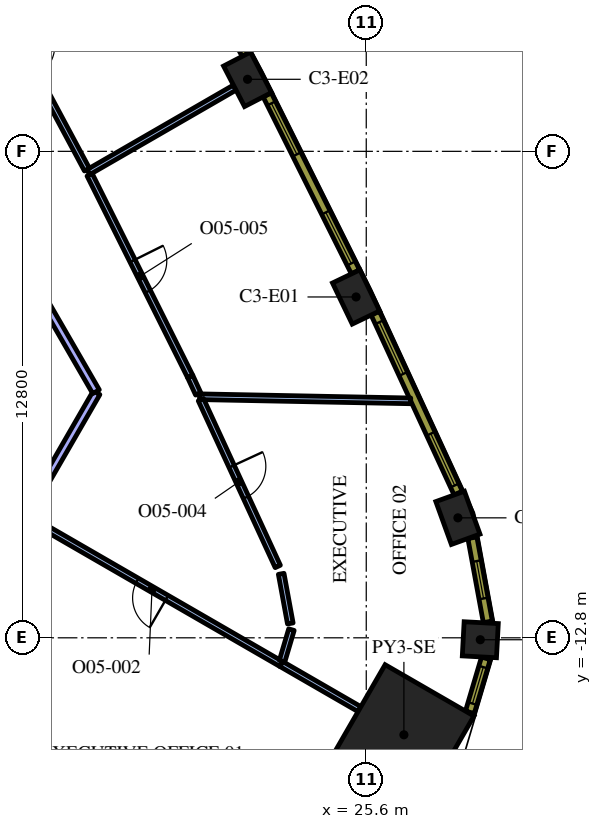
"""IFC4 building model, lengths in metres.
Left out: names, types, materials, properties, quantities, classifications, styles, units other than length and angle.
Written with IfcOpenShell. Run it as: python <this file> out.ifc"""

import sys

from ifc_helpers import new_model, si_unit, direction, frame, frame_2d, origin, origin_2d, place, context, subcontext, project, spatial, rectangle, extrude, element, fill, save


model = new_model("IFC4")
c1 = context("Model", 3, precision=1e-05, world=origin(), true_north=direction((0.0, 1.0)))
c2 = subcontext(c1, "Body", "Model", "MODEL_VIEW")
j1 = project(units=[si_unit("LENGTHUNIT", "METRE"), si_unit("PLANEANGLEUNIT", "RADIAN")], contexts=[c1])
p1 = place(None, origin())
s1 = spatial("IfcSite", under=j1, at=p1, CompositionType="ELEMENT")
p2 = place(p1, origin())
s2 = spatial("IfcBuilding", under=s1, at=p2, CompositionType="ELEMENT")
p3 = place(p2, frame((0.0, 0.0, 192.0)))
s3 = spatial("IfcBuildingStorey", under=s2, at=p3, CompositionType="ELEMENT", Elevation=192.0)
p4 = place(p3, frame((26.591, -15.352, 0.0), z_axis=(0.0, 0.0, 1.0), x_axis=(0.866025403784, -0.5, 0.0)))
e1 = element("IfcColumn", 1, at=p4, inside=s3, PredefinedType="COLUMN", context=c2, shape_type="SweptSolid", body=[
    extrude(rectangle(XDim=2.7, YDim=2.7, at=origin_2d()), origin(), (0.0, 0.0, 1.0), 4.2),
])
p5 = place(p3, frame((28.601, -12.851, 0.0), z_axis=(0.0, 0.0, 1.0), x_axis=(0.0533921468, 0.998573622053, 0.0)))
e2 = element("IfcColumn", 2, at=p5, inside=s3, PredefinedType="COLUMN", context=c2, shape_type="SweptSolid", body=[
    extrude(rectangle(XDim=0.9, YDim=0.9, at=origin_2d()), origin(), (0.0, 0.0, 1.0), 4.2),
])
for number, where, z_axis, x_axis in (
    (3, (28.012, -9.644, 0.0), (0.0, 0.0, 1.0), (-0.341, 0.94, 0.0)),
    (4, (25.332, -3.832, 0.0), (0.0, 0.0, 1.0), (-0.433, 0.902, 0.0)),
    (5, (22.476, 1.896, 0.0), (0.0, 0.0, 1.0), (-0.46, 0.888, 0.0)),
):
    element("IfcColumn", number, at=place(p3, frame(where, z_axis=z_axis, x_axis=x_axis)), inside=s3, PredefinedType="COLUMN", context=c2, shape_type="SweptSolid", body=[
        extrude(rectangle(XDim=1.2, YDim=0.8, at=origin_2d()), origin(), (0.0, 0.0, 1.0), 4.2),
    ])
p6 = place(p3, frame((23.36, -13.487, 0.0), z_axis=(0.0, 0.0, 1.0), x_axis=(0.866013104554, -0.500021302286, 0.0)))
e6 = element("IfcWall", 6, at=p6, inside=s3, PredefinedType="PARTITIONING", context=c2, shape_type="SweptSolid", body=[
    extrude(rectangle(XDim=2.381, YDim=0.15, at=frame_2d((1.19, 0.0))), origin(), (0.0, 0.0, 1.0), 3.1),
])
p7 = place(p3, frame((23.366, -13.491, 0.0), z_axis=(0.0, 0.0, 1.0), x_axis=(-0.866025704444, 0.499999479242, 0.0)))
e7 = element("IfcWall", 7, at=p7, inside=s3, PredefinedType="PARTITIONING", context=c2, shape_type="SweptSolid", body=[
    extrude(rectangle(XDim=7.781, YDim=0.15, at=frame_2d((3.891, 0.0))), origin(), (0.0, 0.0, 1.0), 3.1),
])
p8 = place(p7, frame((3.481, 0.0, 0.0)))
e8 = element("IfcOpeningElement", 8, at=p8, cuts=e7, PredefinedType="OPENING", context=c2, shape_type="SweptSolid", body=[
    extrude(rectangle(XDim=0.9, YDim=2.1, at=frame_2d((0.45, 1.05))), frame((0.0, 0.085, 0.0), z_axis=(0.0, -1.0, 0.0), x_axis=(1.0, 0.0, 0.0)), (0.0, 0.0, 1.0), 0.17),
])
p9 = place(p3, frame((21.213, -6.457, 0.0), z_axis=(0.0, 0.0, 1.0), x_axis=(0.9998097249, -0.019506767933, 0.0)))
e9 = element("IfcWall", 9, at=p9, inside=s3, PredefinedType="PARTITIONING", context=c2, shape_type="SweptSolid", body=[
    extrude(rectangle(XDim=5.557, YDim=0.15, at=frame_2d((2.778, 0.0))), origin(), (0.0, 0.0, 1.0), 3.1),
])
p10 = place(p3, frame((23.385, -13.415, 0.0), z_axis=(0.0, 0.0, 1.0), x_axis=(0.28439571453, 0.958706982116, 0.0)))
e10 = element("IfcWall", 10, at=p10, inside=s3, PredefinedType="PARTITIONING", context=c2, shape_type="SweptSolid", body=[
    extrude(rectangle(XDim=0.865, YDim=0.15, at=frame_2d((0.433, 0.0))), origin(), (0.0, 0.0, 1.0), 3.1),
])
p11 = place(p3, frame((23.601, -12.422, 0.0), z_axis=(0.0, 0.0, 1.0), x_axis=(-0.180633363018, 0.983550501075, 0.0)))
e11 = element("IfcWall", 11, at=p11, inside=s3, PredefinedType="PARTITIONING", context=c2, shape_type="SweptSolid", body=[
    extrude(rectangle(XDim=1.327, YDim=0.15, at=frame_2d((0.664, 0.0))), origin(), (0.0, 0.0, 1.0), 3.1),
])
p12 = place(p3, frame((21.248, -6.533, 0.0), z_axis=(0.0, 0.0, 1.0), x_axis=(0.418705826438, -0.908121925133, 0.0)))
e12 = element("IfcWall", 12, at=p12, inside=s3, PredefinedType="PARTITIONING", context=c2, shape_type="SweptSolid", body=[
    extrude(rectangle(XDim=4.834, YDim=0.15, at=frame_2d((2.417, 0.0))), origin(), (0.0, 0.0, 1.0), 3.1),
])
p13 = place(p12, frame((1.934, 0.0, 0.0)))
e13 = element("IfcOpeningElement", 13, at=p13, cuts=e12, PredefinedType="OPENING", context=c2, shape_type="SweptSolid", body=[
    extrude(rectangle(XDim=0.9, YDim=2.1, at=frame_2d((0.45, 1.05))), frame((0.0, 0.085, 0.0), z_axis=(0.0, -1.0, 0.0), x_axis=(1.0, 0.0, 0.0)), (0.0, 0.0, 1.0), 0.17),
])
p14 = place(p3, frame((18.286, -0.547, 0.0), z_axis=(0.0, 0.0, 1.0), x_axis=(0.866043033223, 0.499969463673, 0.0)))
e14 = element("IfcWall", 14, at=p14, inside=s3, PredefinedType="PARTITIONING", context=c2, shape_type="SweptSolid", body=[
    extrude(rectangle(XDim=4.449, YDim=0.15, at=frame_2d((2.225, 0.0))), origin(), (0.0, 0.0, 1.0), 3.1),
])
p15 = place(p3, frame((21.178, -6.381, 0.0), z_axis=(0.0, 0.0, 1.0), x_axis=(-0.418595665074, 0.908172708895, 0.0)))
e15 = element("IfcWall", 15, at=p15, inside=s3, PredefinedType="PARTITIONING", context=c2, shape_type="SweptSolid", body=[
    extrude(rectangle(XDim=0.502, YDim=0.15, at=frame_2d((0.251, 0.0))), origin(), (0.0, 0.0, 1.0), 3.1),
])
p16 = place(p3, frame((18.32, -0.615, 0.0), z_axis=(0.0, 0.0, 1.0), x_axis=(0.446258864447, -0.894903919928, 0.0)))
e16 = element("IfcWall", 16, at=p16, inside=s3, PredefinedType="PARTITIONING", context=c2, shape_type="SweptSolid", body=[
    extrude(rectangle(XDim=5.934, YDim=0.15, at=frame_2d((2.967, 0.0))), origin(), (0.0, 0.0, 1.0), 3.1),
])
p17 = place(p16, frame((2.534, 0.0, 0.0)))
e17 = element("IfcOpeningElement", 17, at=p17, cuts=e16, PredefinedType="OPENING", context=c2, shape_type="SweptSolid", body=[
    extrude(rectangle(XDim=0.9, YDim=2.1, at=frame_2d((0.45, 1.05))), frame((0.0, 0.085, 0.0), z_axis=(0.0, -1.0, 0.0), x_axis=(1.0, 0.0, 0.0)), (0.0, 0.0, 1.0), 0.17),
])
p18 = place(p3, frame((15.219, 5.177, 0.0), z_axis=(0.0, 0.0, 1.0), x_axis=(0.472318506028, -0.881427948765, 0.0)))
e18 = element("IfcWall", 18, at=p18, inside=s3, PredefinedType="PARTITIONING", context=c2, shape_type="SweptSolid", body=[
    extrude(rectangle(XDim=6.419, YDim=0.15, at=frame_2d((3.21, 0.0))), origin(), (0.0, 0.0, 1.0), 3.1),
])
p19 = place(p18, frame((2.719, 0.0, 0.0)))
e19 = element("IfcOpeningElement", 19, at=p19, cuts=e18, PredefinedType="OPENING", context=c2, shape_type="SweptSolid", body=[
    extrude(rectangle(XDim=0.9, YDim=2.1, at=frame_2d((0.45, 1.05))), frame((0.0, 0.085, 0.0), z_axis=(0.0, -1.0, 0.0), x_axis=(1.0, 0.0, 0.0)), (0.0, 0.0, 1.0), 0.17),
])
p20 = place(p3, frame((16.665, -9.535, 0.0), z_axis=(0.0, 0.0, 1.0), x_axis=(0.499994443168, 0.866028611999, 0.0)))
e20 = element("IfcWall", 20, at=p20, inside=s3, PredefinedType="PARTITIONING", context=c2, shape_type="SweptSolid", body=[
    extrude(rectangle(XDim=3.678, YDim=0.2, at=frame_2d((1.839, 0.0))), origin(), (0.0, 0.0, 1.0), 3.1),
])
p21 = place(p3, frame((18.489, -6.324, 0.0), z_axis=(0.0, 0.0, 1.0), x_axis=(-0.500006134913, 0.866021861762, 0.0)))
e21 = element("IfcWall", 21, at=p21, inside=s3, PredefinedType="PARTITIONING", context=c2, shape_type="SweptSolid", body=[
    extrude(rectangle(XDim=8.691, YDim=0.2, at=frame_2d((4.346, 0.0))), origin(), (0.0, 0.0, 1.0), 3.1),
])
p22 = place(p3, frame((28.326, -14.76, 0.0), z_axis=(0.0, 0.0, 1.0), x_axis=(0.284413721403, 0.958701640281, 0.0)))
e22 = element("IfcWall", 22, at=p22, inside=s3, PredefinedType="SOLIDWALL", context=c2, shape_type="SweptSolid", body=[
    extrude(rectangle(XDim=1.482, YDim=0.24, at=frame_2d((0.741, 0.0))), origin(), (0.0, 0.0, 1.0), 3.9),
])
p23 = place(p22, frame((0.241, 0.0, 0.9)))
e23 = element("IfcOpeningElement", 23, at=p23, cuts=e22, PredefinedType="OPENING", context=c2, shape_type="SweptSolid", body=[
    extrude(rectangle(XDim=1.0, YDim=2.55, at=frame_2d((0.5, 1.275))), frame((0.0, 0.13, 0.0), z_axis=(0.0, -1.0, 0.0), x_axis=(1.0, 0.0, 0.0)), (0.0, 0.0, 1.0), 0.26),
])
p24 = place(p3, frame((28.799, -12.38, 0.0), z_axis=(0.0, 0.0, 1.0), x_axis=(-0.180737189259, 0.983531427265, 0.0)))
e24 = element("IfcWall", 24, at=p24, inside=s3, PredefinedType="SOLIDWALL", context=c2, shape_type="SweptSolid", body=[
    extrude(rectangle(XDim=2.25, YDim=0.24, at=frame_2d((1.125, 0.0))), origin(), (0.0, 0.0, 1.0), 3.9),
])
p25 = place(p24, frame((0.625, 0.0, 0.9)))
e25 = element("IfcOpeningElement", 25, at=p25, cuts=e24, PredefinedType="OPENING", context=c2, shape_type="SweptSolid", body=[
    extrude(rectangle(XDim=1.0, YDim=2.55, at=frame_2d((0.5, 1.275))), frame((0.0, 0.13, 0.0), z_axis=(0.0, -1.0, 0.0), x_axis=(1.0, 0.0, 0.0)), (0.0, 0.0, 1.0), 0.26),
])
p26 = place(p3, frame((28.02, -8.992, 0.0), z_axis=(0.0, 0.0, 1.0), x_axis=(-0.418722559465, 0.908114209885, 0.0)))
e26 = element("IfcWall", 26, at=p26, inside=s3, PredefinedType="SOLIDWALL", context=c2, shape_type="SweptSolid", body=[
    extrude(rectangle(XDim=5.213, YDim=0.24, at=frame_2d((2.606, 0.0))), origin(), (0.0, 0.0, 1.0), 3.9),
])
p27 = place(p26, frame((0.221, 0.0, 0.9)))
e27 = element("IfcOpeningElement", 27, at=p27, cuts=e26, PredefinedType="OPENING", context=c2, shape_type="SweptSolid", body=[
    extrude(rectangle(XDim=1.5, YDim=2.55, at=frame_2d((0.75, 1.275))), frame((0.0, 0.13, 0.0), z_axis=(0.0, -1.0, 0.0), x_axis=(1.0, 0.0, 0.0)), (0.0, 0.0, 1.0), 0.26),
])
p28 = place(p26, frame((3.452, 0.0, 0.9)))
e28 = element("IfcOpeningElement", 28, at=p28, cuts=e26, PredefinedType="OPENING", context=c2, shape_type="SweptSolid", body=[
    extrude(rectangle(XDim=1.5, YDim=2.55, at=frame_2d((0.75, 1.275))), frame((0.0, 0.13, 0.0), z_axis=(0.0, -1.0, 0.0), x_axis=(1.0, 0.0, 0.0)), (0.0, 0.0, 1.0), 0.26),
])
p29 = place(p3, frame((25.316, -3.171, 0.0), z_axis=(0.0, 0.0, 1.0), x_axis=(-0.446256171312, 0.8949052629, 0.0)))
e29 = element("IfcWall", 29, at=p29, inside=s3, PredefinedType="SOLIDWALL", context=c2, shape_type="SweptSolid", body=[
    extrude(rectangle(XDim=5.203, YDim=0.24, at=frame_2d((2.602, 0.0))), origin(), (0.0, 0.0, 1.0), 3.9),
])
p30 = place(p29, frame((0.248, 0.0, 0.9)))
e30 = element("IfcOpeningElement", 30, at=p30, cuts=e29, PredefinedType="OPENING", context=c2, shape_type="SweptSolid", body=[
    extrude(rectangle(XDim=1.5, YDim=2.55, at=frame_2d((0.75, 1.275))), frame((0.0, 0.13, 0.0), z_axis=(0.0, -1.0, 0.0), x_axis=(1.0, 0.0, 0.0)), (0.0, 0.0, 1.0), 0.26),
])
p31 = place(p29, frame((3.455, 0.0, 0.9)))
e31 = element("IfcOpeningElement", 31, at=p31, cuts=e29, PredefinedType="OPENING", context=c2, shape_type="SweptSolid", body=[
    extrude(rectangle(XDim=1.5, YDim=2.55, at=frame_2d((0.75, 1.275))), frame((0.0, 0.13, 0.0), z_axis=(0.0, -1.0, 0.0), x_axis=(1.0, 0.0, 0.0)), (0.0, 0.0, 1.0), 0.26),
])
p32 = place(p3, frame((22.44, 2.555, 0.0), z_axis=(0.0, 0.0, 1.0), x_axis=(-0.473349833294, 0.880874528704, 0.0)))
e32 = element("IfcWall", 32, at=p32, inside=s3, PredefinedType="SOLIDWALL", context=c2, shape_type="SweptSolid", body=[
    extrude(rectangle(XDim=5.204, YDim=0.24, at=frame_2d((2.602, 0.0))), origin(), (0.0, 0.0, 1.0), 3.9),
])
p33 = place(p32, frame((0.248, 0.0, 0.9)))
e33 = element("IfcOpeningElement", 33, at=p33, cuts=e32, PredefinedType="OPENING", context=c2, shape_type="SweptSolid", body=[
    extrude(rectangle(XDim=1.5, YDim=2.55, at=frame_2d((0.75, 1.275))), frame((0.0, 0.13, 0.0), z_axis=(0.0, -1.0, 0.0), x_axis=(1.0, 0.0, 0.0)), (0.0, 0.0, 1.0), 0.26),
])
p34 = place(p32, frame((3.455, 0.0, 0.9)))
e34 = element("IfcOpeningElement", 34, at=p34, cuts=e32, PredefinedType="OPENING", context=c2, shape_type="SweptSolid", body=[
    extrude(rectangle(XDim=1.5, YDim=2.55, at=frame_2d((0.75, 1.275))), frame((0.0, 0.13, 0.0), z_axis=(0.0, -1.0, 0.0), x_axis=(1.0, 0.0, 0.0)), (0.0, 0.0, 1.0), 0.26),
])
p35 = place(p8, origin())
e35 = element("IfcDoor", 35, at=p35, inside=s3, OperationType="SINGLE_SWING_RIGHT", PredefinedType="DOOR", context=c2, shape_type="SweptSolid", body=[
    extrude(rectangle(XDim=0.9, YDim=2.1, at=frame_2d((0.45, 1.05))), frame((0.0, 0.025, 0.0), z_axis=(0.0, -1.0, 0.0), x_axis=(1.0, 0.0, 0.0)), (0.0, 0.0, 1.0), 0.05),
])
fill(e8, e35)
p36 = place(p13, origin())
e36 = element("IfcDoor", 36, at=p36, inside=s3, OperationType="SINGLE_SWING_LEFT", PredefinedType="DOOR", context=c2, shape_type="SweptSolid", body=[
    extrude(rectangle(XDim=0.9, YDim=2.1, at=frame_2d((0.45, 1.05))), frame((0.0, 0.025, 0.0), z_axis=(0.0, -1.0, 0.0), x_axis=(1.0, 0.0, 0.0)), (0.0, 0.0, 1.0), 0.05),
])
fill(e13, e36)
p37 = place(p17, origin())
e37 = element("IfcDoor", 37, at=p37, inside=s3, OperationType="SINGLE_SWING_RIGHT", PredefinedType="DOOR", context=c2, shape_type="SweptSolid", body=[
    extrude(rectangle(XDim=0.9, YDim=2.1, at=frame_2d((0.45, 1.05))), frame((0.0, 0.025, 0.0), z_axis=(0.0, -1.0, 0.0), x_axis=(1.0, 0.0, 0.0)), (0.0, 0.0, 1.0), 0.05),
])
fill(e17, e37)
p38 = place(p23, origin())
e38 = element("IfcWindow", 38, at=p38, inside=s3, PartitioningType="SINGLE_PANEL", PredefinedType="WINDOW", context=c2, shape_type="SweptSolid", body=[
    extrude(rectangle(XDim=1.0, YDim=2.55, at=frame_2d((0.5, 1.275))), frame((0.0, 0.04, 0.0), z_axis=(0.0, -1.0, 0.0), x_axis=(1.0, 0.0, 0.0)), (0.0, 0.0, 1.0), 0.06),
])
fill(e23, e38)
p39 = place(p25, origin())
e39 = element("IfcWindow", 39, at=p39, inside=s3, PartitioningType="SINGLE_PANEL", PredefinedType="WINDOW", context=c2, shape_type="SweptSolid", body=[
    extrude(rectangle(XDim=1.0, YDim=2.55, at=frame_2d((0.5, 1.275))), frame((0.0, 0.04, 0.0), z_axis=(0.0, -1.0, 0.0), x_axis=(1.0, 0.0, 0.0)), (0.0, 0.0, 1.0), 0.06),
])
fill(e25, e39)
p40 = place(p27, origin())
e40 = element("IfcWindow", 40, at=p40, inside=s3, PartitioningType="SINGLE_PANEL", PredefinedType="WINDOW", context=c2, shape_type="SweptSolid", body=[
    extrude(rectangle(XDim=1.5, YDim=2.55, at=frame_2d((0.75, 1.275))), frame((0.0, 0.04, 0.0), z_axis=(0.0, -1.0, 0.0), x_axis=(1.0, 0.0, 0.0)), (0.0, 0.0, 1.0), 0.06),
])
fill(e27, e40)
p41 = place(p28, origin())
e41 = element("IfcWindow", 41, at=p41, inside=s3, PartitioningType="SINGLE_PANEL", PredefinedType="WINDOW", context=c2, shape_type="SweptSolid", body=[
    extrude(rectangle(XDim=1.5, YDim=2.55, at=frame_2d((0.75, 1.275))), frame((0.0, 0.04, 0.0), z_axis=(0.0, -1.0, 0.0), x_axis=(1.0, 0.0, 0.0)), (0.0, 0.0, 1.0), 0.06),
])
fill(e28, e41)
p42 = place(p30, origin())
e42 = element("IfcWindow", 42, at=p42, inside=s3, PartitioningType="SINGLE_PANEL", PredefinedType="WINDOW", context=c2, shape_type="SweptSolid", body=[
    extrude(rectangle(XDim=1.5, YDim=2.55, at=frame_2d((0.75, 1.275))), frame((0.0, 0.04, 0.0), z_axis=(0.0, -1.0, 0.0), x_axis=(1.0, 0.0, 0.0)), (0.0, 0.0, 1.0), 0.06),
])
fill(e30, e42)
p43 = place(p31, origin())
e43 = element("IfcWindow", 43, at=p43, inside=s3, PartitioningType="SINGLE_PANEL", PredefinedType="WINDOW", context=c2, shape_type="SweptSolid", body=[
    extrude(rectangle(XDim=1.5, YDim=2.55, at=frame_2d((0.75, 1.275))), frame((0.0, 0.04, 0.0), z_axis=(0.0, -1.0, 0.0), x_axis=(1.0, 0.0, 0.0)), (0.0, 0.0, 1.0), 0.06),
])
fill(e31, e43)
save(model, sys.argv[1])
